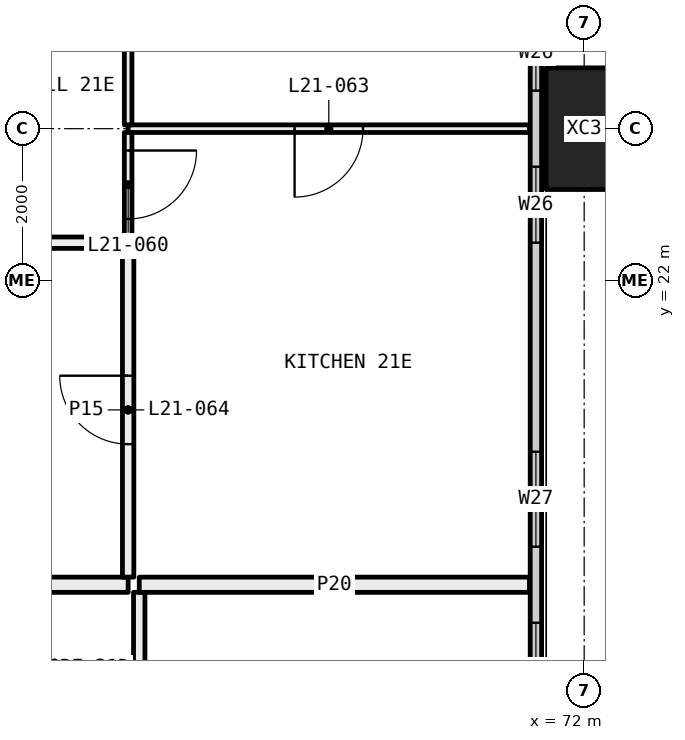
"""IFC4 building model, lengths in metres.
Left out: names, types, materials, properties, quantities, classifications, styles, units other than length and angle.
Written with IfcOpenShell. Run it as: python <this file> out.ifc"""

import sys

from ifc_helpers import new_model, si_unit, direction, frame, frame_2d, origin, origin_2d, place, context, subcontext, project, spatial, rectangle, hollow_rectangle, extrude, element, fill, save


model = new_model("IFC4")
c1 = context("Model", 3, precision=1e-05, world=origin(), true_north=direction((0.0, 1.0)))
c2 = subcontext(c1, "Body", "Model", "MODEL_VIEW")
j1 = project(units=[si_unit("LENGTHUNIT", "METRE"), si_unit("PLANEANGLEUNIT", "RADIAN")], contexts=[c1])
p1 = place(None, origin())
s1 = spatial("IfcSite", under=j1, at=p1, CompositionType="ELEMENT")
p2 = place(p1, origin())
s2 = spatial("IfcBuilding", under=s1, at=p2, CompositionType="ELEMENT")
p3 = place(p2, frame((0.0, 0.0, 85.2)))
s3 = spatial("IfcBuildingStorey", under=s2, at=p3, CompositionType="ELEMENT", Elevation=85.2)
p4 = place(p3, frame((72.0, 24.0, -0.4), z_axis=(0.0, 0.0, 1.0), x_axis=(0.0, 1.0, 0.0)))
e1 = element("IfcColumn", 1, at=p4, inside=s3, PredefinedType="COLUMN", context=c2, shape_type="SweptSolid", body=[
    extrude(hollow_rectangle(XDim=1.6, YDim=1.0, WallThickness=0.065, at=origin_2d()), origin(), (0.0, 0.0, 1.0), 3.45),
])
p5 = place(p3, frame((71.365, 6.71, 0.0), z_axis=(0.0, 0.0, 1.0), x_axis=(0.0, 1.0, 0.0)))
e2 = element("IfcWall", 2, at=p5, inside=s3, PredefinedType="ELEMENTEDWALL", context=c2, shape_type="SweptSolid", body=[
    extrude(rectangle(XDim=34.58, YDim=0.15, at=frame_2d((17.29, 0.0))), origin(), (0.0, 0.0, 1.0), 3.05),
])
p6 = place(p5, frame((0.29, 0.0, 0.45)))
e3 = element("IfcOpeningElement", 3, at=p6, cuts=e2, PredefinedType="OPENING", context=c2, shape_type="SweptSolid", body=[
    extrude(rectangle(XDim=4.5, YDim=2.55, at=frame_2d((2.25, 1.275))), frame((0.0, 0.085, 0.0), z_axis=(0.0, -1.0, 0.0), x_axis=(1.0, 0.0, 0.0)), (0.0, 0.0, 1.0), 0.17),
])
p7 = place(p5, frame((5.79, 0.0, 0.45)))
e4 = element("IfcOpeningElement", 4, at=p7, cuts=e2, PredefinedType="OPENING", context=c2, shape_type="SweptSolid", body=[
    extrude(rectangle(XDim=1.0, YDim=2.55, at=frame_2d((0.5, 1.275))), frame((0.0, 0.085, 0.0), z_axis=(0.0, -1.0, 0.0), x_axis=(1.0, 0.0, 0.0)), (0.0, 0.0, 1.0), 0.17),
])
p8 = place(p5, frame((9.54, 0.0, 0.45)))
e5 = element("IfcOpeningElement", 5, at=p8, cuts=e2, PredefinedType="OPENING", context=c2, shape_type="SweptSolid", body=[
    extrude(rectangle(XDim=1.25, YDim=2.55, at=frame_2d((0.625, 1.275))), frame((0.0, 0.085, 0.0), z_axis=(0.0, -1.0, 0.0), x_axis=(1.0, 0.0, 0.0)), (0.0, 0.0, 1.0), 0.17),
])
p9 = place(p5, frame((11.79, 0.0, 0.45)))
e6 = element("IfcOpeningElement", 6, at=p9, cuts=e2, PredefinedType="OPENING", context=c2, shape_type="SweptSolid", body=[
    extrude(rectangle(XDim=1.25, YDim=2.55, at=frame_2d((0.625, 1.275))), frame((0.0, 0.085, 0.0), z_axis=(0.0, -1.0, 0.0), x_axis=(1.0, 0.0, 0.0)), (0.0, 0.0, 1.0), 0.17),
])
p10 = place(p5, frame((15.79, 0.0, 0.45)))
e7 = element("IfcOpeningElement", 7, at=p10, cuts=e2, PredefinedType="OPENING", context=c2, shape_type="SweptSolid", body=[
    extrude(rectangle(XDim=1.0, YDim=2.55, at=frame_2d((0.5, 1.275))), frame((0.0, 0.085, 0.0), z_axis=(0.0, -1.0, 0.0), x_axis=(1.0, 0.0, 0.0)), (0.0, 0.0, 1.0), 0.17),
])
p11 = place(p5, frame((17.79, 0.0, 0.45)))
e8 = element("IfcOpeningElement", 8, at=p11, cuts=e2, PredefinedType="OPENING", context=c2, shape_type="SweptSolid", body=[
    extrude(rectangle(XDim=1.0, YDim=2.55, at=frame_2d((0.5, 1.275))), frame((0.0, 0.085, 0.0), z_axis=(0.0, -1.0, 0.0), x_axis=(1.0, 0.0, 0.0)), (0.0, 0.0, 1.0), 0.17),
])
p12 = place(p5, frame((21.54, 0.0, 0.45)))
e9 = element("IfcOpeningElement", 9, at=p12, cuts=e2, PredefinedType="OPENING", context=c2, shape_type="SweptSolid", body=[
    extrude(rectangle(XDim=1.25, YDim=2.55, at=frame_2d((0.625, 1.275))), frame((0.0, 0.085, 0.0), z_axis=(0.0, -1.0, 0.0), x_axis=(1.0, 0.0, 0.0)), (0.0, 0.0, 1.0), 0.17),
])
p13 = place(p5, frame((23.79, 0.0, 0.45)))
e10 = element("IfcOpeningElement", 10, at=p13, cuts=e2, PredefinedType="OPENING", context=c2, shape_type="SweptSolid", body=[
    extrude(rectangle(XDim=1.25, YDim=2.55, at=frame_2d((0.625, 1.275))), frame((0.0, 0.085, 0.0), z_axis=(0.0, -1.0, 0.0), x_axis=(1.0, 0.0, 0.0)), (0.0, 0.0, 1.0), 0.17),
])
p14 = place(p5, frame((27.79, 0.0, 0.45)))
e11 = element("IfcOpeningElement", 11, at=p14, cuts=e2, PredefinedType="OPENING", context=c2, shape_type="SweptSolid", body=[
    extrude(rectangle(XDim=1.0, YDim=2.55, at=frame_2d((0.5, 1.275))), frame((0.0, 0.085, 0.0), z_axis=(0.0, -1.0, 0.0), x_axis=(1.0, 0.0, 0.0)), (0.0, 0.0, 1.0), 0.17),
])
p15 = place(p5, frame((29.79, 0.0, 0.45)))
e12 = element("IfcOpeningElement", 12, at=p15, cuts=e2, PredefinedType="OPENING", context=c2, shape_type="SweptSolid", body=[
    extrude(rectangle(XDim=4.5, YDim=2.55, at=frame_2d((2.25, 1.275))), frame((0.0, 0.085, 0.0), z_axis=(0.0, -1.0, 0.0), x_axis=(1.0, 0.0, 0.0)), (0.0, 0.0, 1.0), 0.17),
])
p16 = place(p3, frame((66.146, 17.9, 0.0), z_axis=(0.0, 0.0, 1.0), x_axis=(0.0, -1.0, 0.0)))
e13 = element("IfcWall", 13, at=p16, inside=s3, PredefinedType="PARTITIONING", context=c2, shape_type="SweptSolid", body=[
    extrude(rectangle(XDim=2.086, YDim=0.15, at=frame_2d((1.043, 0.0))), origin(), (0.0, 0.0, 1.0), 2.55),
])
p17 = place(p3, frame((71.28, 18.0, 0.0), z_axis=(0.0, 0.0, 1.0), x_axis=(-1.0, 0.0, 0.0)))
e14 = element("IfcWall", 14, at=p17, inside=s3, PredefinedType="PARTITIONING", context=c2, shape_type="SweptSolid", body=[
    extrude(rectangle(XDim=5.134, YDim=0.2, at=frame_2d((2.567, 0.0))), origin(), (0.0, 0.0, 1.0), 3.05),
])
p18 = place(p3, frame((66.0, 18.0, 0.0), z_axis=(0.0, 0.0, 1.0), x_axis=(-1.0, 0.0, 0.0)))
e15 = element("IfcWall", 15, at=p18, inside=s3, PredefinedType="PARTITIONING", context=c2, shape_type="SweptSolid", body=[
    extrude(rectangle(XDim=3.0, YDim=0.2, at=frame_2d((1.5, 0.0))), origin(), (0.0, 0.0, 1.0), 3.05),
])
p19 = place(p3, frame((71.28, 24.0, 0.0), z_axis=(0.0, 0.0, 1.0), x_axis=(-1.0, 0.0, 0.0)))
e16 = element("IfcWall", 16, at=p19, inside=s3, PredefinedType="PARTITIONING", context=c2, shape_type="SweptSolid", body=[
    extrude(rectangle(XDim=5.28, YDim=0.1, at=frame_2d((2.64, 0.0))), origin(), (0.0, 0.0, 1.0), 2.45),
])
p20 = place(p19, frame((2.19, 0.0, 0.0)))
e17 = element("IfcOpeningElement", 17, at=p20, cuts=e16, PredefinedType="OPENING", context=c2, shape_type="SweptSolid", body=[
    extrude(rectangle(XDim=0.9, YDim=2.1, at=frame_2d((0.45, 1.05))), frame((0.0, 0.06, 0.0), z_axis=(0.0, -1.0, 0.0), x_axis=(1.0, 0.0, 0.0)), (0.0, 0.0, 1.0), 0.12),
])
p21 = place(p3, frame((66.0, 22.5, 0.0), z_axis=(0.0, 0.0, 1.0), x_axis=(0.0, -1.0, 0.0)))
e18 = element("IfcWall", 18, at=p21, inside=s3, PredefinedType="PARTITIONING", context=c2, shape_type="SweptSolid", body=[
    extrude(rectangle(XDim=4.4, YDim=0.15, at=frame_2d((2.2, 0.0))), origin(), (0.0, 0.0, 1.0), 3.05),
])
p22 = place(p21, frame((1.75, 0.0, 0.0)))
e19 = element("IfcOpeningElement", 19, at=p22, cuts=e18, PredefinedType="OPENING", context=c2, shape_type="SweptSolid", body=[
    extrude(rectangle(XDim=0.9, YDim=2.1, at=frame_2d((0.45, 1.05))), frame((0.0, 0.085, 0.0), z_axis=(0.0, -1.0, 0.0), x_axis=(1.0, 0.0, 0.0)), (0.0, 0.0, 1.0), 0.17),
])
p23 = place(p3, frame((66.0, 23.95, 0.0), z_axis=(0.0, 0.0, 1.0), x_axis=(0.0, -1.0, 0.0)))
e20 = element("IfcWall", 20, at=p23, inside=s3, PredefinedType="PARTITIONING", context=c2, shape_type="SweptSolid", body=[
    extrude(rectangle(XDim=1.375, YDim=0.1, at=frame_2d((0.688, 0.0))), origin(), (0.0, 0.0, 1.0), 2.45),
])
p24 = place(p23, frame((0.238, 0.0, 0.0)))
e21 = element("IfcOpeningElement", 21, at=p24, cuts=e20, PredefinedType="OPENING", context=c2, shape_type="SweptSolid", body=[
    extrude(rectangle(XDim=0.9, YDim=2.1, at=frame_2d((0.45, 1.05))), frame((0.0, 0.06, 0.0), z_axis=(0.0, -1.0, 0.0), x_axis=(1.0, 0.0, 0.0)), (0.0, 0.0, 1.0), 0.12),
])
p25 = place(p3, frame((66.0, 27.0, 0.0), z_axis=(0.0, 0.0, 1.0), x_axis=(0.0, -1.0, 0.0)))
e22 = element("IfcWall", 22, at=p25, inside=s3, PredefinedType="PARTITIONING", context=c2, shape_type="SweptSolid", body=[
    extrude(rectangle(XDim=2.95, YDim=0.1, at=frame_2d((1.475, 0.0))), origin(), (0.0, 0.0, 1.0), 2.45),
])
p26 = place(p3, frame((65.925, 22.5, 0.0), z_axis=(0.0, 0.0, 1.0), x_axis=(-1.0, 0.0, 0.0)))
e23 = element("IfcWall", 23, at=p26, inside=s3, PredefinedType="PARTITIONING", context=c2, shape_type="SweptSolid", body=[
    extrude(rectangle(XDim=3.925, YDim=0.15, at=frame_2d((1.962, 0.0))), origin(), (0.0, 0.0, 1.0), 3.05),
])
p27 = place(p8, origin())
e24 = element("IfcWindow", 24, at=p27, inside=s3, PartitioningType="SINGLE_PANEL", PredefinedType="WINDOW", context=c2, shape_type="SweptSolid", body=[
    extrude(rectangle(XDim=1.25, YDim=2.55, at=frame_2d((0.625, 1.275))), frame((0.0, 0.03, 0.0), z_axis=(0.0, -1.0, 0.0), x_axis=(1.0, 0.0, 0.0)), (0.0, 0.0, 1.0), 0.06),
])
fill(e5, e24)
p28 = place(p9, origin())
e25 = element("IfcWindow", 25, at=p28, inside=s3, PartitioningType="SINGLE_PANEL", PredefinedType="WINDOW", context=c2, shape_type="SweptSolid", body=[
    extrude(rectangle(XDim=1.25, YDim=2.55, at=frame_2d((0.625, 1.275))), frame((0.0, 0.03, 0.0), z_axis=(0.0, -1.0, 0.0), x_axis=(1.0, 0.0, 0.0)), (0.0, 0.0, 1.0), 0.06),
])
fill(e6, e25)
p29 = place(p10, origin())
e26 = element("IfcWindow", 26, at=p29, inside=s3, PartitioningType="SINGLE_PANEL", PredefinedType="WINDOW", context=c2, shape_type="SweptSolid", body=[
    extrude(rectangle(XDim=1.0, YDim=2.55, at=frame_2d((0.5, 1.275))), frame((0.0, 0.03, 0.0), z_axis=(0.0, -1.0, 0.0), x_axis=(1.0, 0.0, 0.0)), (0.0, 0.0, 1.0), 0.06),
])
fill(e7, e26)
p30 = place(p11, origin())
e27 = element("IfcWindow", 27, at=p30, inside=s3, PartitioningType="SINGLE_PANEL", PredefinedType="WINDOW", context=c2, shape_type="SweptSolid", body=[
    extrude(rectangle(XDim=1.0, YDim=2.55, at=frame_2d((0.5, 1.275))), frame((0.0, 0.03, 0.0), z_axis=(0.0, -1.0, 0.0), x_axis=(1.0, 0.0, 0.0)), (0.0, 0.0, 1.0), 0.06),
])
fill(e8, e27)
p31 = place(p24, origin())
e28 = element("IfcDoor", 28, at=p31, inside=s3, OperationType="SINGLE_SWING_RIGHT", PredefinedType="DOOR", context=c2, shape_type="SweptSolid", body=[
    extrude(rectangle(XDim=0.9, YDim=2.1, at=frame_2d((0.45, 1.05))), frame((0.0, 0.025, 0.0), z_axis=(0.0, -1.0, 0.0), x_axis=(1.0, 0.0, 0.0)), (0.0, 0.0, 1.0), 0.05),
])
fill(e21, e28)
p32 = place(p20, origin())
e29 = element("IfcDoor", 29, at=p32, inside=s3, OperationType="SINGLE_SWING_LEFT", PredefinedType="DOOR", context=c2, shape_type="SweptSolid", body=[
    extrude(rectangle(XDim=0.9, YDim=2.1, at=frame_2d((0.45, 1.05))), frame((0.0, 0.025, 0.0), z_axis=(0.0, -1.0, 0.0), x_axis=(1.0, 0.0, 0.0)), (0.0, 0.0, 1.0), 0.05),
])
fill(e17, e29)
p33 = place(p22, frame((0.9, 0.0, 0.0), x_axis=(-1.0, 0.0, 0.0)))
e30 = element("IfcDoor", 30, at=p33, inside=s3, OperationType="SINGLE_SWING_LEFT", PredefinedType="DOOR", context=c2, shape_type="SweptSolid", body=[
    extrude(rectangle(XDim=0.9, YDim=2.1, at=frame_2d((0.45, 1.05))), frame((0.0, 0.025, 0.0), z_axis=(0.0, -1.0, 0.0), x_axis=(1.0, 0.0, 0.0)), (0.0, 0.0, 1.0), 0.05),
])
fill(e19, e30)
save(model, sys.argv[1])
